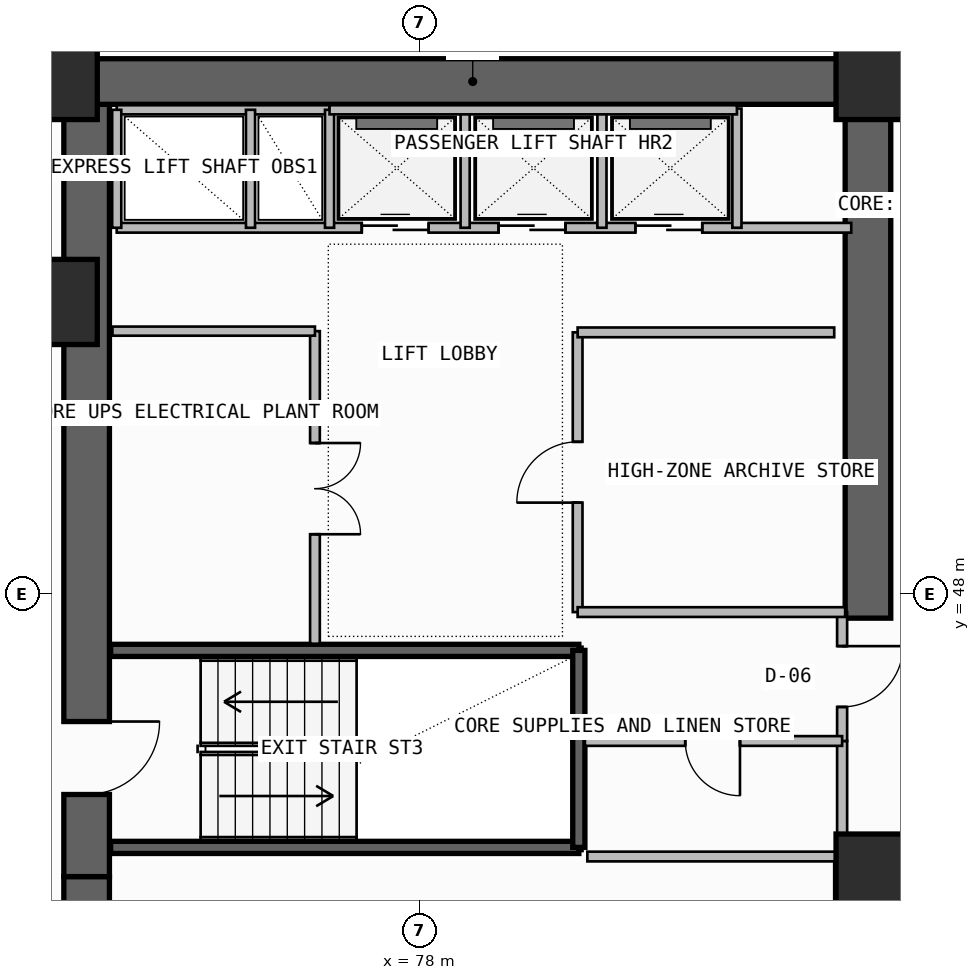
"""IFC4 building model, lengths in metres.
Left out: names, types, materials, properties, quantities, classifications, styles, units other than length and angle.
Written with IfcOpenShell. Run it as: python <this file> out.ifc"""

import sys

from ifc_helpers import new_model, si_unit, direction, frame, frame_2d, origin, origin_2d, place, context, subcontext, project, spatial, rectangle, extrude, element, fill, save


model = new_model("IFC4")
c1 = context("Model", 3, precision=1e-05, world=origin(), true_north=direction((0.0, 1.0)))
c2 = subcontext(c1, "Body", "Model", "MODEL_VIEW")
j1 = project(units=[si_unit("LENGTHUNIT", "METRE"), si_unit("PLANEANGLEUNIT", "RADIAN")], contexts=[c1])
p1 = place(None, origin())
s1 = spatial("IfcSite", under=j1, at=p1, CompositionType="ELEMENT")
p2 = place(p1, origin())
s2 = spatial("IfcBuilding", under=s1, at=p2, CompositionType="ELEMENT")
p3 = place(p2, frame((0.0, 0.0, 200.9)))
s3 = spatial("IfcBuildingStorey", under=s2, at=p3, CompositionType="ELEMENT", Elevation=200.9)
p4 = place(p3, frame((72.525, 35.5, -0.4), z_axis=(0.0, 0.0, 1.0), x_axis=(0.0, 1.0, 0.0)))
e1 = element("IfcWall", 1, at=p4, inside=s3, PredefinedType="SHEAR", context=c2, shape_type="SweptSolid", body=[
    extrude(rectangle(XDim=7.85, YDim=0.75, at=frame_2d((3.925, 0.0))), origin(), (0.0, 0.0, 1.0), 3.66),
])
p5 = place(p4, frame((1.45, 0.0, 0.4)))
e2 = element("IfcOpeningElement", 2, at=p5, cuts=e1, PredefinedType="OPENING", context=c2, shape_type="SweptSolid", body=[
    extrude(rectangle(XDim=1.2, YDim=2.2, at=frame_2d((0.6, 1.1))), frame((0.0, 0.385, 0.0), z_axis=(0.0, -1.0, 0.0), x_axis=(1.0, 0.0, 0.0)), (0.0, 0.0, 1.0), 0.77),
])
p6 = place(p3, frame((72.525, 43.35, -0.4), z_axis=(0.0, 0.0, 1.0), x_axis=(0.0, 1.0, 0.0)))
e3 = element("IfcWall", 3, at=p6, inside=s3, PredefinedType="SHEAR", context=c2, shape_type="SweptSolid", body=[
    extrude(rectangle(XDim=12.7, YDim=0.75, at=frame_2d((6.35, 0.0))), origin(), (0.0, 0.0, 1.0), 3.66),
])
p7 = place(p6, frame((1.35, 0.0, 0.4)))
e4 = element("IfcOpeningElement", 4, at=p7, cuts=e3, PredefinedType="OPENING", context=c2, shape_type="SweptSolid", body=[
    extrude(rectangle(XDim=1.2, YDim=2.2, at=frame_2d((0.6, 1.1))), frame((0.0, 0.385, 0.0), z_axis=(0.0, -1.0, 0.0), x_axis=(1.0, 0.0, 0.0)), (0.0, 0.0, 1.0), 0.77),
])
p8 = place(p3, frame((72.0, 56.425, -0.4), z_axis=(0.0, 0.0, 1.0), x_axis=(1.0, 0.0, 0.0)))
e5 = element("IfcWall", 5, at=p8, inside=s3, PredefinedType="SHEAR", context=c2, shape_type="SweptSolid", body=[
    extrude(rectangle(XDim=13.75, YDim=0.75, at=frame_2d((6.875, 0.0))), origin(), (0.0, 0.0, 1.0), 3.66),
])
p9 = place(p3, frame((85.375, 47.6, -0.4), z_axis=(0.0, 0.0, 1.0), x_axis=(0.0, 1.0, 0.0)))
e6 = element("IfcWall", 6, at=p9, inside=s3, PredefinedType="SHEAR", context=c2, shape_type="SweptSolid", body=[
    extrude(rectangle(XDim=8.45, YDim=0.75, at=frame_2d((4.225, 0.0))), origin(), (0.0, 0.0, 1.0), 3.66),
])
for number, where, z_axis, x_axis in (
    (7, (85.55, 43.35, 0.0), (0.0, 0.0, 1.0), (1.0, 0.0, 0.0)),
    (8, (72.0, 52.8, 0.0), (0.0, 0.0, 1.0), (1.0, 0.0, 0.0)),
    (9, (72.0, 56.5, 0.0), (0.0, 0.0, 1.0), (1.0, 0.0, 0.0)),
    (10, (85.55, 56.5, 0.0), (0.0, 0.0, 1.0), (1.0, 0.0, 0.0)),
):
    element("IfcColumn", number, at=place(p3, frame(where, z_axis=z_axis, x_axis=x_axis)), inside=s3, PredefinedType="COLUMN", context=c2, shape_type="SweptSolid", body=[
        extrude(rectangle(XDim=1.4, YDim=1.4, at=origin_2d()), origin(), (0.0, 0.0, 1.0), 3.52),
    ])
p10 = place(p3, frame((116.396, 56.722, 0.0), z_axis=(0.0, 0.0, 1.0), x_axis=(-0.977936620644, 0.208901809478, 0.0)))
e11 = element("IfcWall", 11, at=p10, inside=s3, PredefinedType="PARAPET", context=c2, shape_type="SweptSolid", body=[
    extrude(rectangle(XDim=31.685, YDim=0.2, at=frame_2d((15.843, 0.0))), origin(), (0.0, 0.0, 1.0), 1.15),
])
p11 = place(p3, frame((84.92, 38.85, 0.0), z_axis=(0.0, 0.0, 1.0), x_axis=(0.0, 1.0, 0.0)))
e12 = element("IfcWall", 12, at=p11, inside=s3, PredefinedType="SOLIDWALL", context=c2, shape_type="SweptSolid", body=[
    extrude(rectangle(XDim=4.83, YDim=0.2, at=frame_2d((2.415, 0.0))), origin(), (0.0, 0.0, 1.0), 3.26),
])
p12 = place(p11, frame((1.25, 0.0, 0.0)))
e13 = element("IfcOpeningElement", 13, at=p12, cuts=e12, PredefinedType="OPENING", context=c2, shape_type="SweptSolid", body=[
    extrude(rectangle(XDim=1.1, YDim=2.2, at=frame_2d((0.55, 1.1))), frame((0.0, 0.11, 0.0), z_axis=(0.0, -1.0, 0.0), x_axis=(1.0, 0.0, 0.0)), (0.0, 0.0, 1.0), 0.22),
])
for number, where, z_axis, x_axis in (
    (14, (72.92, 43.83, -0.4), (0.0, 0.0, 1.0), (1.0, 0.0, 0.0)),
    (15, (72.92, 47.07, -0.4), (0.0, 0.0, 1.0), (1.0, 0.0, 0.0)),
):
    element("IfcWall", number, at=place(p3, frame(where, z_axis=z_axis, x_axis=x_axis)), inside=s3, PredefinedType="SOLIDWALL", context=c2, shape_type="SweptSolid", body=[
        extrude(rectangle(XDim=7.7, YDim=0.2, at=frame_2d((3.85, 0.0))), origin(), (0.0, 0.0, 1.0), 3.66),
    ])
p13 = place(p3, frame((80.62, 43.83, -0.4), z_axis=(0.0, 0.0, 1.0), x_axis=(0.0, 1.0, 0.0)))
e16 = element("IfcWall", 16, at=p13, inside=s3, PredefinedType="SOLIDWALL", context=c2, shape_type="SweptSolid", body=[
    extrude(rectangle(XDim=3.24, YDim=0.2, at=frame_2d((1.62, 0.0))), origin(), (0.0, 0.0, 1.0), 3.66),
])
p14 = place(p3, frame((84.95, 43.68, 0.0), z_axis=(0.0, 0.0, 1.0), x_axis=(0.0, 1.0, 0.0)))
e17 = element("IfcWall", 17, at=p14, inside=s3, PredefinedType="PLUMBINGWALL", context=c2, shape_type="SweptSolid", body=[
    extrude(rectangle(XDim=1.9, YDim=0.165, at=frame_2d((0.95, 0.0))), origin(), (0.0, 0.0, 1.0), 3.26),
])
p15 = place(p3, frame((84.95, 45.58, 0.0), z_axis=(0.0, 0.0, 1.0), x_axis=(0.0, 1.0, 0.0)))
e18 = element("IfcWall", 18, at=p15, inside=s3, PredefinedType="PARTITIONING", context=c2, shape_type="SweptSolid", body=[
    extrude(rectangle(XDim=2.12, YDim=0.165, at=frame_2d((1.06, 0.0))), origin(), (0.0, 0.0, 1.0), 3.26),
])
p16 = place(p15, frame((0.56, 0.0, 0.0)))
e19 = element("IfcOpeningElement", 19, at=p16, cuts=e18, PredefinedType="OPENING", context=c2, shape_type="SweptSolid", body=[
    extrude(rectangle(XDim=1.0, YDim=2.2, at=frame_2d((0.5, 1.1))), frame((0.0, 0.093, 0.0), z_axis=(0.0, -1.0, 0.0), x_axis=(1.0, 0.0, 0.0)), (0.0, 0.0, 1.0), 0.185),
])
p17 = place(p3, frame((80.72, 45.58, 0.0), z_axis=(0.0, 0.0, 1.0), x_axis=(1.0, 0.0, 0.0)))
e20 = element("IfcWall", 20, at=p17, inside=s3, PredefinedType="PLUMBINGWALL", context=c2, shape_type="SweptSolid", body=[
    extrude(rectangle(XDim=4.23, YDim=0.16, at=frame_2d((2.115, 0.0))), origin(), (0.0, 0.0, 1.0), 3.26),
])
p18 = place(p17, frame((1.65, 0.0, 0.0)))
e21 = element("IfcOpeningElement", 21, at=p18, cuts=e20, PredefinedType="OPENING", context=c2, shape_type="SweptSolid", body=[
    extrude(rectangle(XDim=0.9, YDim=2.1, at=frame_2d((0.45, 1.05))), frame((0.0, 0.09, 0.0), z_axis=(0.0, -1.0, 0.0), x_axis=(1.0, 0.0, 0.0)), (0.0, 0.0, 1.0), 0.18),
])
p19 = place(p3, frame((80.76, 43.68, 0.0), z_axis=(0.0, 0.0, 1.0), x_axis=(1.0, 0.0, 0.0)))
e22 = element("IfcWall", 22, at=p19, inside=s3, PredefinedType="PLUMBINGWALL", context=c2, shape_type="SweptSolid", body=[
    extrude(rectangle(XDim=4.19, YDim=0.16, at=frame_2d((2.095, 0.0))), origin(), (0.0, 0.0, 1.0), 3.26),
])
p20 = place(p3, frame((76.28, 47.18, 0.0), z_axis=(0.0, 0.0, 1.0), x_axis=(0.0, 1.0, 0.0)))
e23 = element("IfcWall", 23, at=p20, inside=s3, PredefinedType="SOLIDWALL", context=c2, shape_type="SweptSolid", body=[
    extrude(rectangle(XDim=5.14, YDim=0.16, at=frame_2d((2.57, 0.0))), origin(), (0.0, 0.0, 1.0), 3.26),
])
p21 = place(p20, frame((1.8, 0.0, 0.0)))
e24 = element("IfcOpeningElement", 24, at=p21, cuts=e23, PredefinedType="OPENING", context=c2, shape_type="SweptSolid", body=[
    extrude(rectangle(XDim=1.5, YDim=2.25, at=frame_2d((0.75, 1.125))), frame((0.0, 0.09, 0.0), z_axis=(0.0, -1.0, 0.0), x_axis=(1.0, 0.0, 0.0)), (0.0, 0.0, 1.0), 0.18),
])
p22 = place(p3, frame((72.95, 52.32, 0.0), z_axis=(0.0, 0.0, 1.0), x_axis=(1.0, 0.0, 0.0)))
e25 = element("IfcWall", 25, at=p22, inside=s3, PredefinedType="SOLIDWALL", context=c2, shape_type="SweptSolid", body=[
    extrude(rectangle(XDim=3.33, YDim=0.15, at=frame_2d((1.665, 0.0))), origin(), (0.0, 0.0, 1.0), 3.26),
])
p23 = place(p3, frame((80.6, 47.7, 0.0), z_axis=(0.0, 0.0, 1.0), x_axis=(0.0, 1.0, 0.0)))
e26 = element("IfcWall", 26, at=p23, inside=s3, PredefinedType="SOLIDWALL", context=c2, shape_type="SweptSolid", body=[
    extrude(rectangle(XDim=4.6, YDim=0.16, at=frame_2d((2.3, 0.0))), origin(), (0.0, 0.0, 1.0), 3.26),
])
p24 = place(p23, frame((1.8, 0.0, 0.0)))
e27 = element("IfcOpeningElement", 27, at=p24, cuts=e26, PredefinedType="OPENING", context=c2, shape_type="SweptSolid", body=[
    extrude(rectangle(XDim=1.0, YDim=2.2, at=frame_2d((0.5, 1.1))), frame((0.0, 0.09, 0.0), z_axis=(0.0, -1.0, 0.0), x_axis=(1.0, 0.0, 0.0)), (0.0, 0.0, 1.0), 0.18),
])
p25 = place(p3, frame((80.6, 47.7, 0.0), z_axis=(0.0, 0.0, 1.0), x_axis=(1.0, 0.0, 0.0)))
e28 = element("IfcWall", 28, at=p25, inside=s3, PredefinedType="SOLIDWALL", context=c2, shape_type="SweptSolid", body=[
    extrude(rectangle(XDim=4.4, YDim=0.16, at=frame_2d((2.2, 0.0))), origin(), (0.0, 0.0, 1.0), 3.26),
])
p26 = place(p3, frame((80.6, 52.3, 0.0), z_axis=(0.0, 0.0, 1.0), x_axis=(1.0, 0.0, 0.0)))
e29 = element("IfcWall", 29, at=p26, inside=s3, PredefinedType="SOLIDWALL", context=c2, shape_type="SweptSolid", body=[
    extrude(rectangle(XDim=4.22, YDim=0.16, at=frame_2d((2.11, 0.0))), origin(), (0.0, 0.0, 1.0), 3.26),
])
p27 = place(p3, frame((73.02, 54.02, 0.0), z_axis=(0.0, 0.0, 1.0), x_axis=(1.0, 0.0, 0.0)))
e30 = element("IfcWall", 30, at=p27, inside=s3, PredefinedType="SOLIDWALL", context=c2, shape_type="SweptSolid", body=[
    extrude(rectangle(XDim=12.08, YDim=0.16, at=frame_2d((6.04, 0.0))), origin(), (0.0, 0.0, 1.0), 3.26),
])
p28 = place(p27, frame((4.03, 0.0, 0.0)))
e31 = element("IfcOpeningElement", 31, at=p28, cuts=e30, PredefinedType="OPENING", context=c2, shape_type="SweptSolid", body=[
    extrude(rectangle(XDim=1.1, YDim=2.25, at=frame_2d((0.55, 1.125))), frame((0.0, 0.09, 0.0), z_axis=(0.0, -1.0, 0.0), x_axis=(1.0, 0.0, 0.0)), (0.0, 0.0, 1.0), 0.18),
])
p29 = place(p27, frame((6.28, 0.0, 0.0)))
e32 = element("IfcOpeningElement", 32, at=p29, cuts=e30, PredefinedType="OPENING", context=c2, shape_type="SweptSolid", body=[
    extrude(rectangle(XDim=1.1, YDim=2.25, at=frame_2d((0.55, 1.125))), frame((0.0, 0.09, 0.0), z_axis=(0.0, -1.0, 0.0), x_axis=(1.0, 0.0, 0.0)), (0.0, 0.0, 1.0), 0.18),
])
p30 = place(p27, frame((8.53, 0.0, 0.0)))
e33 = element("IfcOpeningElement", 33, at=p30, cuts=e30, PredefinedType="OPENING", context=c2, shape_type="SweptSolid", body=[
    extrude(rectangle(XDim=1.1, YDim=2.25, at=frame_2d((0.55, 1.125))), frame((0.0, 0.09, 0.0), z_axis=(0.0, -1.0, 0.0), x_axis=(1.0, 0.0, 0.0)), (0.0, 0.0, 1.0), 0.18),
])
p31 = place(p3, frame((73.02, 55.96, 0.0), z_axis=(0.0, 0.0, 1.0), x_axis=(1.0, 0.0, 0.0)))
e34 = element("IfcWall", 34, at=p31, inside=s3, PredefinedType="SOLIDWALL", context=c2, shape_type="SweptSolid", body=[
    extrude(rectangle(XDim=3.5, YDim=0.15, at=frame_2d((1.75, 0.0))), origin(), (0.0, 0.0, 1.0), 3.26),
])
p32 = place(p3, frame((73.02, 54.02, 0.0), z_axis=(0.0, 0.0, 1.0), x_axis=(0.0, 1.0, 0.0)))
e35 = element("IfcWall", 35, at=p32, inside=s3, PredefinedType="PLUMBINGWALL", context=c2, shape_type="SweptSolid", body=[
    extrude(rectangle(XDim=1.94, YDim=0.15, at=frame_2d((0.97, 0.0))), origin(), (0.0, 0.0, 1.0), 3.26),
])
p33 = place(p3, frame((76.52, 54.02, 0.0), z_axis=(0.0, 0.0, 1.0), x_axis=(0.0, 1.0, 0.0)))
e36 = element("IfcWall", 36, at=p33, inside=s3, PredefinedType="SOLIDWALL", context=c2, shape_type="SweptSolid", body=[
    extrude(rectangle(XDim=1.94, YDim=0.15, at=frame_2d((0.97, 0.0))), origin(), (0.0, 0.0, 1.0), 3.26),
])
p34 = place(p3, frame((75.22, 54.02, 0.0), z_axis=(0.0, 0.0, 1.0), x_axis=(0.0, 1.0, 0.0)))
e37 = element("IfcWall", 37, at=p34, inside=s3, PredefinedType="PLUMBINGWALL", context=c2, shape_type="SweptSolid", body=[
    extrude(rectangle(XDim=1.94, YDim=0.15, at=frame_2d((0.97, 0.0))), origin(), (0.0, 0.0, 1.0), 3.26),
])
for number, where, z_axis, x_axis in (
    (38, (78.75, 54.02, 0.0), (0.0, 0.0, 1.0), (0.0, 1.0, 0.0)),
    (39, (81.0, 54.02, 0.0), (0.0, 0.0, 1.0), (0.0, 1.0, 0.0)),
):
    element("IfcWall", number, at=place(p3, frame(where, z_axis=z_axis, x_axis=x_axis)), inside=s3, PredefinedType="PLUMBINGWALL", context=c2, shape_type="SweptSolid", body=[
        extrude(rectangle(XDim=1.96, YDim=0.15, at=frame_2d((0.98, 0.0))), origin(), (0.0, 0.0, 1.0), 3.26),
    ])
p35 = place(p3, frame((83.22, 54.02, 0.0), z_axis=(0.0, 0.0, 1.0), x_axis=(0.0, 1.0, 0.0)))
e40 = element("IfcWall", 40, at=p35, inside=s3, PredefinedType="SOLIDWALL", context=c2, shape_type="SweptSolid", body=[
    extrude(rectangle(XDim=1.96, YDim=0.15, at=frame_2d((0.98, 0.0))), origin(), (0.0, 0.0, 1.0), 3.26),
])
p36 = place(p3, frame((76.52, 55.96, 0.0), z_axis=(0.0, 0.0, 1.0), x_axis=(1.0, 0.0, 0.0)))
e41 = element("IfcWall", 41, at=p36, inside=s3, PredefinedType="SOLIDWALL", context=c2, shape_type="SweptSolid", body=[
    extrude(rectangle(XDim=6.7, YDim=0.15, at=frame_2d((3.35, 0.0))), origin(), (0.0, 0.0, 1.0), 3.26),
])
p37 = place(p7, frame((1.2, 0.0, 0.0), z_axis=(0.0, 0.0, 1.0), x_axis=(-1.0, 0.0, 0.0)))
e42 = element("IfcDoor", 42, at=p37, inside=s3, OperationType="SINGLE_SWING_LEFT", PredefinedType="USERDEFINED", context=c2, shape_type="SweptSolid", body=[
    extrude(rectangle(XDim=1.2, YDim=2.2, at=frame_2d((0.6, 1.1))), frame((0.0, 0.025, 0.0), z_axis=(0.0, -1.0, 0.0), x_axis=(1.0, 0.0, 0.0)), (0.0, 0.0, 1.0), 0.05),
])
fill(e4, e42)
p38 = place(p16, frame((1.0, 0.0, 0.0), z_axis=(0.0, 0.0, 1.0), x_axis=(-1.0, 0.0, 0.0)))
e43 = element("IfcDoor", 43, at=p38, inside=s3, OperationType="SINGLE_SWING_LEFT", PredefinedType="DOOR", context=c2, shape_type="SweptSolid", body=[
    extrude(rectangle(XDim=1.0, YDim=2.2, at=frame_2d((0.5, 1.1))), frame((0.0, 0.025, 0.0), z_axis=(0.0, -1.0, 0.0), x_axis=(1.0, 0.0, 0.0)), (0.0, 0.0, 1.0), 0.05),
])
fill(e19, e43)
p39 = place(p18, frame((0.9, 0.0, 0.0), z_axis=(0.0, 0.0, 1.0), x_axis=(-1.0, 0.0, 0.0)))
e44 = element("IfcDoor", 44, at=p39, inside=s3, OperationType="SINGLE_SWING_LEFT", PredefinedType="DOOR", context=c2, shape_type="SweptSolid", body=[
    extrude(rectangle(XDim=0.9, YDim=2.1, at=frame_2d((0.45, 1.05))), frame((0.0, 0.025, 0.0), z_axis=(0.0, -1.0, 0.0), x_axis=(1.0, 0.0, 0.0)), (0.0, 0.0, 1.0), 0.05),
])
fill(e21, e44)
p40 = place(p21, frame((1.5, 0.0, 0.0), z_axis=(0.0, 0.0, 1.0), x_axis=(-1.0, 0.0, 0.0)))
e45 = element("IfcDoor", 45, at=p40, inside=s3, OperationType="DOUBLE_DOOR_SINGLE_SWING", PredefinedType="DOOR", context=c2, shape_type="SweptSolid", body=[
    extrude(rectangle(XDim=1.5, YDim=2.25, at=frame_2d((0.75, 1.125))), frame((0.0, 0.025, 0.0), z_axis=(0.0, -1.0, 0.0), x_axis=(1.0, 0.0, 0.0)), (0.0, 0.0, 1.0), 0.05),
])
fill(e24, e45)
p41 = place(p24, origin())
e46 = element("IfcDoor", 46, at=p41, inside=s3, OperationType="SINGLE_SWING_LEFT", PredefinedType="DOOR", context=c2, shape_type="SweptSolid", body=[
    extrude(rectangle(XDim=1.0, YDim=2.2, at=frame_2d((0.5, 1.1))), frame((0.0, 0.025, 0.0), z_axis=(0.0, -1.0, 0.0), x_axis=(1.0, 0.0, 0.0)), (0.0, 0.0, 1.0), 0.05),
])
fill(e27, e46)
p42 = place(p28, origin())
e47 = element("IfcDoor", 47, at=p42, inside=s3, OperationType="DOUBLE_DOOR_SLIDING", PredefinedType="DOOR", context=c2, shape_type="SweptSolid", body=[
    extrude(rectangle(XDim=1.1, YDim=2.25, at=frame_2d((0.55, 1.125))), frame((0.0, 0.025, 0.0), z_axis=(0.0, -1.0, 0.0), x_axis=(1.0, 0.0, 0.0)), (0.0, 0.0, 1.0), 0.05),
])
fill(e31, e47)
p43 = place(p29, origin())
e48 = element("IfcDoor", 48, at=p43, inside=s3, OperationType="DOUBLE_DOOR_SLIDING", PredefinedType="DOOR", context=c2, shape_type="SweptSolid", body=[
    extrude(rectangle(XDim=1.1, YDim=2.25, at=frame_2d((0.55, 1.125))), frame((0.0, 0.025, 0.0), z_axis=(0.0, -1.0, 0.0), x_axis=(1.0, 0.0, 0.0)), (0.0, 0.0, 1.0), 0.05),
])
fill(e32, e48)
p44 = place(p30, origin())
e49 = element("IfcDoor", 49, at=p44, inside=s3, OperationType="DOUBLE_DOOR_SLIDING", PredefinedType="DOOR", context=c2, shape_type="SweptSolid", body=[
    extrude(rectangle(XDim=1.1, YDim=2.25, at=frame_2d((0.55, 1.125))), frame((0.0, 0.025, 0.0), z_axis=(0.0, -1.0, 0.0), x_axis=(1.0, 0.0, 0.0)), (0.0, 0.0, 1.0), 0.05),
])
fill(e33, e49)
save(model, sys.argv[1])
